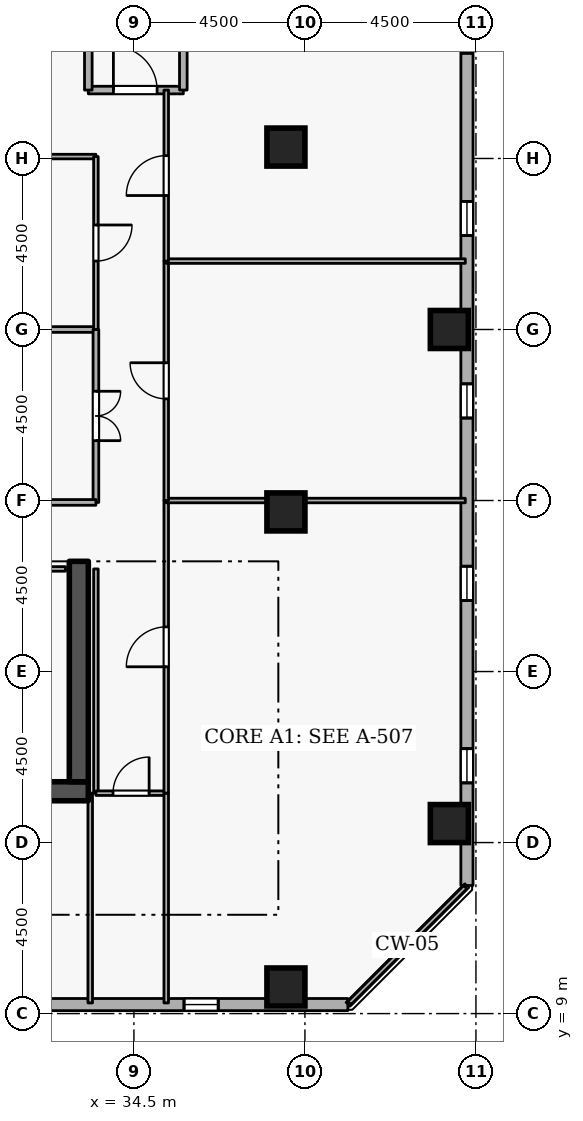
"""IFC4 building model, lengths in metres.
Left out: names, types, materials, properties, quantities, classifications, styles, units other than length and angle.
Written with IfcOpenShell. Run it as: python <this file> out.ifc"""

import sys

from ifc_helpers import new_model, si_unit, direction, frame, frame_2d, origin, origin_2d, place, context, subcontext, project, spatial, rectangle, extrude, element, fill, save


model = new_model("IFC4")
c1 = context("Model", 3, precision=1e-05, world=origin(), true_north=direction((0.0, 1.0)))
c2 = subcontext(c1, "Body", "Model", "MODEL_VIEW")
j1 = project(units=[si_unit("LENGTHUNIT", "METRE"), si_unit("PLANEANGLEUNIT", "RADIAN")], contexts=[c1])
p1 = place(None, origin())
s1 = spatial("IfcSite", under=j1, at=p1, CompositionType="ELEMENT")
p2 = place(p1, origin())
s2 = spatial("IfcBuilding", under=s1, at=p2, CompositionType="ELEMENT")
p3 = place(p2, frame((0.0, 0.0, 214.5)))
s3 = spatial("IfcBuildingStorey", under=s2, at=p3, CompositionType="ELEMENT", Elevation=214.5)
p4 = place(p3, frame((17.7, 14.85, 0.0), z_axis=(0.0, 0.0, 1.0), x_axis=(1.0, 0.0, 0.0)))
e1 = element("IfcWall", 1, at=p4, inside=s3, PredefinedType="SHEAR", context=c2, shape_type="SweptSolid", body=[
    extrude(rectangle(XDim=15.6, YDim=0.5, at=frame_2d((7.8, 0.0))), origin(), (0.0, 0.0, 1.0), 3.6),
])
p5 = place(p3, frame((33.05, 15.1, 0.0), z_axis=(0.0, 0.0, 1.0), x_axis=(0.0, 1.0, 0.0)))
e2 = element("IfcWall", 2, at=p5, inside=s3, PredefinedType="SHEAR", context=c2, shape_type="SweptSolid", body=[
    extrude(rectangle(XDim=5.8, YDim=0.5, at=frame_2d((2.9, 0.0))), origin(), (0.0, 0.0, 1.0), 3.6),
])
for number, where, z_axis, x_axis in (
    (3, (38.5, 9.7, 0.0), (0.0, 0.0, 1.0), (1.0, 0.0, 0.0)),
    (4, (42.8, 14.0, 0.0), (0.0, 0.0, 1.0), (1.0, 0.0, 0.0)),
    (5, (42.8, 27.0, 0.0), (0.0, 0.0, 1.0), (1.0, 0.0, 0.0)),
    (6, (38.5, 22.2, 0.0), (0.0, 0.0, 1.0), (1.0, 0.0, 0.0)),
    (7, (38.5, 31.8, 0.0), (0.0, 0.0, 1.0), (1.0, 0.0, 0.0)),
):
    element("IfcColumn", number, at=place(p3, frame(where, z_axis=z_axis, x_axis=x_axis)), inside=s3, PredefinedType="COLUMN", context=c2, shape_type="SweptSolid", body=[
        extrude(rectangle(XDim=1.0, YDim=1.0, at=origin_2d()), origin(), (0.0, 0.0, 1.0), 3.6),
    ])
p6 = place(p3, frame((4.319, 9.235, 0.0), z_axis=(0.0, 0.0, 1.0), x_axis=(0.999999998513, 5.4540124e-05, 0.0)))
e8 = element("IfcWall", 8, at=p6, inside=s3, PredefinedType="STANDARD", context=c2, shape_type="SweptSolid", body=[
    extrude(rectangle(XDim=35.811, YDim=0.32, at=frame_2d((17.905, 0.0))), origin(), (0.0, 0.0, 1.0), 2.7),
])
p7 = place(p6, frame((2.7, 0.0, 0.72)))
e9 = element("IfcOpeningElement", 9, at=p7, cuts=e8, PredefinedType="OPENING", context=c2, shape_type="SweptSolid", body=[
    extrude(rectangle(XDim=0.9, YDim=1.75, at=frame_2d((0.45, 0.875))), frame((0.0, 0.17, 0.0), z_axis=(0.0, -1.0, 0.0), x_axis=(1.0, 0.0, 0.0)), (0.0, 0.0, 1.0), 0.34),
])
p8 = place(p6, frame((12.3, 0.0, 0.72)))
e10 = element("IfcOpeningElement", 10, at=p8, cuts=e8, PredefinedType="OPENING", context=c2, shape_type="SweptSolid", body=[
    extrude(rectangle(XDim=0.9, YDim=1.75, at=frame_2d((0.45, 0.875))), frame((0.0, 0.17, 0.0), z_axis=(0.0, -1.0, 0.0), x_axis=(1.0, 0.0, 0.0)), (0.0, 0.0, 1.0), 0.34),
])
p9 = place(p6, frame((17.1, 0.0, 0.72)))
e11 = element("IfcOpeningElement", 11, at=p9, cuts=e8, PredefinedType="OPENING", context=c2, shape_type="SweptSolid", body=[
    extrude(rectangle(XDim=0.9, YDim=1.75, at=frame_2d((0.45, 0.875))), frame((0.0, 0.17, 0.0), z_axis=(0.0, -1.0, 0.0), x_axis=(1.0, 0.0, 0.0)), (0.0, 0.0, 1.0), 0.34),
])
p10 = place(p6, frame((26.7, 0.0, 0.72)))
e12 = element("IfcOpeningElement", 12, at=p10, cuts=e8, PredefinedType="OPENING", context=c2, shape_type="SweptSolid", body=[
    extrude(rectangle(XDim=0.9, YDim=1.75, at=frame_2d((0.45, 0.875))), frame((0.0, 0.17, 0.0), z_axis=(0.0, -1.0, 0.0), x_axis=(1.0, 0.0, 0.0)), (0.0, 0.0, 1.0), 0.34),
])
p11 = place(p6, frame((31.5, 0.0, 0.72)))
e13 = element("IfcOpeningElement", 13, at=p11, cuts=e8, PredefinedType="OPENING", context=c2, shape_type="SweptSolid", body=[
    extrude(rectangle(XDim=0.9, YDim=1.75, at=frame_2d((0.45, 0.875))), frame((0.0, 0.17, 0.0), z_axis=(0.0, -1.0, 0.0), x_axis=(1.0, 0.0, 0.0)), (0.0, 0.0, 1.0), 0.34),
])
p12 = place(p3, frame((43.263, 12.371, 0.0), z_axis=(0.0, 0.0, 1.0), x_axis=(5.4540124e-05, 0.999999998513, 0.0)))
e14 = element("IfcWall", 14, at=p12, inside=s3, PredefinedType="STANDARD", context=c2, shape_type="SweptSolid", body=[
    extrude(rectangle(XDim=35.811, YDim=0.32, at=frame_2d((17.905, 0.0))), origin(), (0.0, 0.0, 1.0), 2.7),
])
p13 = place(p12, frame((2.7, 0.0, 0.72)))
e15 = element("IfcOpeningElement", 15, at=p13, cuts=e14, PredefinedType="OPENING", context=c2, shape_type="SweptSolid", body=[
    extrude(rectangle(XDim=0.9, YDim=1.75, at=frame_2d((0.45, 0.875))), frame((0.0, 0.17, 0.0), z_axis=(0.0, -1.0, 0.0), x_axis=(1.0, 0.0, 0.0)), (0.0, 0.0, 1.0), 0.34),
])
p14 = place(p12, frame((7.5, 0.0, 0.72)))
e16 = element("IfcOpeningElement", 16, at=p14, cuts=e14, PredefinedType="OPENING", context=c2, shape_type="SweptSolid", body=[
    extrude(rectangle(XDim=0.9, YDim=1.75, at=frame_2d((0.45, 0.875))), frame((0.0, 0.17, 0.0), z_axis=(0.0, -1.0, 0.0), x_axis=(1.0, 0.0, 0.0)), (0.0, 0.0, 1.0), 0.34),
])
p15 = place(p12, frame((12.3, 0.0, 0.72)))
e17 = element("IfcOpeningElement", 17, at=p15, cuts=e14, PredefinedType="OPENING", context=c2, shape_type="SweptSolid", body=[
    extrude(rectangle(XDim=0.9, YDim=1.75, at=frame_2d((0.45, 0.875))), frame((0.0, 0.17, 0.0), z_axis=(0.0, -1.0, 0.0), x_axis=(1.0, 0.0, 0.0)), (0.0, 0.0, 1.0), 0.34),
])
p16 = place(p12, frame((17.1, 0.0, 0.72)))
e18 = element("IfcOpeningElement", 18, at=p16, cuts=e14, PredefinedType="OPENING", context=c2, shape_type="SweptSolid", body=[
    extrude(rectangle(XDim=0.9, YDim=1.75, at=frame_2d((0.45, 0.875))), frame((0.0, 0.17, 0.0), z_axis=(0.0, -1.0, 0.0), x_axis=(1.0, 0.0, 0.0)), (0.0, 0.0, 1.0), 0.34),
])
p17 = place(p12, frame((21.9, 0.0, 0.72)))
e19 = element("IfcOpeningElement", 19, at=p17, cuts=e14, PredefinedType="OPENING", context=c2, shape_type="SweptSolid", body=[
    extrude(rectangle(XDim=0.9, YDim=1.75, at=frame_2d((0.45, 0.875))), frame((0.0, 0.17, 0.0), z_axis=(0.0, -1.0, 0.0), x_axis=(1.0, 0.0, 0.0)), (0.0, 0.0, 1.0), 0.34),
])
p18 = place(p12, frame((31.5, 0.0, 0.72)))
e20 = element("IfcOpeningElement", 20, at=p18, cuts=e14, PredefinedType="OPENING", context=c2, shape_type="SweptSolid", body=[
    extrude(rectangle(XDim=0.9, YDim=1.75, at=frame_2d((0.45, 0.875))), frame((0.0, 0.17, 0.0), z_axis=(0.0, -1.0, 0.0), x_axis=(1.0, 0.0, 0.0)), (0.0, 0.0, 1.0), 0.34),
])
p19 = place(p3, frame((33.3, 33.3, 0.0), z_axis=(0.0, 0.0, 1.0), x_axis=(1.0, 0.0, 0.0)))
e21 = element("IfcWall", 21, at=p19, inside=s3, PredefinedType="STANDARD", context=c2, shape_type="SweptSolid", body=[
    extrude(rectangle(XDim=2.5, YDim=0.2, at=frame_2d((1.25, 0.0))), origin(), (0.0, 0.0, 1.0), 3.34),
])
p20 = place(p19, frame((0.66, 0.0, 0.0)))
e22 = element("IfcOpeningElement", 22, at=p20, cuts=e21, PredefinedType="OPENING", context=c2, shape_type="SweptSolid", body=[
    extrude(rectangle(XDim=1.15, YDim=2.1, at=frame_2d((0.575, 1.05))), frame((0.0, 0.11, 0.0), z_axis=(0.0, -1.0, 0.0), x_axis=(1.0, 0.0, 0.0)), (0.0, 0.0, 1.0), 0.22),
])
p21 = place(p3, frame((35.8, 33.3, 0.0), z_axis=(0.0, 0.0, 1.0), x_axis=(0.0, 1.0, 0.0)))
e23 = element("IfcWall", 23, at=p21, inside=s3, PredefinedType="STANDARD", context=c2, shape_type="SweptSolid", body=[
    extrude(rectangle(XDim=5.7, YDim=0.2, at=frame_2d((2.85, 0.0))), origin(), (0.0, 0.0, 1.0), 3.34),
])
p22 = place(p3, frame((33.3, 35.6, 0.0), z_axis=(0.0, 0.0, 1.0), x_axis=(0.0, -1.0, 0.0)))
e24 = element("IfcWall", 24, at=p22, inside=s3, PredefinedType="STANDARD", context=c2, shape_type="SweptSolid", body=[
    extrude(rectangle(XDim=2.3, YDim=0.2, at=frame_2d((1.15, 0.0))), origin(), (0.0, 0.0, 1.0), 2.545),
])
p23 = place(p3, frame((30.6, 20.7, 0.0), z_axis=(0.0, 0.0, 1.0), x_axis=(1.0, 0.0, 0.0)))
e25 = element("IfcWall", 25, at=p23, inside=s3, PredefinedType="PARTITIONING", context=c2, shape_type="SweptSolid", body=[
    extrude(rectangle(XDim=2.1, YDim=0.12, at=frame_2d((1.05, 0.0))), origin(), (0.0, 0.0, 1.0), 3.34),
])
p24 = place(p23, frame((0.575, 0.0, 0.0)))
e26 = element("IfcOpeningElement", 26, at=p24, cuts=e25, PredefinedType="OPENING", context=c2, shape_type="SweptSolid", body=[
    extrude(rectangle(XDim=0.95, YDim=2.1, at=frame_2d((0.475, 1.05))), frame((0.0, 0.07, 0.0), z_axis=(0.0, -1.0, 0.0), x_axis=(1.0, 0.0, 0.0)), (0.0, 0.0, 1.0), 0.14),
])
p25 = place(p3, frame((33.5, 20.7, 0.0), z_axis=(0.0, 0.0, 1.0), x_axis=(0.0, -1.0, 0.0)))
e27 = element("IfcWall", 27, at=p25, inside=s3, PredefinedType="PARTITIONING", context=c2, shape_type="SweptSolid", body=[
    extrude(rectangle(XDim=5.9, YDim=0.12, at=frame_2d((2.95, 0.0))), origin(), (0.0, 0.0, 1.0), 3.34),
])
p26 = place(p3, frame((33.5, 14.8, 0.0), z_axis=(0.0, 0.0, 1.0), x_axis=(1.0, 0.0, 0.0)))
e28 = element("IfcWall", 28, at=p26, inside=s3, PredefinedType="PARTITIONING", context=c2, shape_type="SweptSolid", body=[
    extrude(rectangle(XDim=1.85, YDim=0.12, at=frame_2d((0.925, 0.0))), origin(), (0.0, 0.0, 1.0), 3.34),
])
p27 = place(p26, frame((0.45, 0.0, 0.0)))
e29 = element("IfcOpeningElement", 29, at=p27, cuts=e28, PredefinedType="OPENING", context=c2, shape_type="SweptSolid", body=[
    extrude(rectangle(XDim=0.95, YDim=2.1, at=frame_2d((0.475, 1.05))), frame((0.0, 0.07, 0.0), z_axis=(0.0, -1.0, 0.0), x_axis=(1.0, 0.0, 0.0)), (0.0, 0.0, 1.0), 0.14),
])
for number, where, z_axis, x_axis in (
    (30, (35.35, 14.8, 0.0), (0.0, 0.0, 1.0), (0.0, -1.0, 0.0)),
    (31, (33.35, 9.28, 0.0), (0.0, 0.0, 1.0), (0.0, 1.0, 0.0)),
):
    element("IfcWall", number, at=place(p3, frame(where, z_axis=z_axis, x_axis=x_axis)), inside=s3, PredefinedType="PARTITIONING", context=c2, shape_type="SweptSolid", body=[
        extrude(rectangle(XDim=5.52, YDim=0.12, at=frame_2d((2.76, 0.0))), origin(), (0.0, 0.0, 1.0), 3.34),
    ])
p28 = place(p3, frame((35.35, 14.8, 0.0), z_axis=(0.0, 0.0, 1.0), x_axis=(0.0, 1.0, 0.0)))
e32 = element("IfcWall", 32, at=p28, inside=s3, PredefinedType="PARTITIONING", context=c2, shape_type="SweptSolid", body=[
    extrude(rectangle(XDim=7.7, YDim=0.12, at=frame_2d((3.85, 0.0))), origin(), (0.0, 0.0, 1.0), 3.34),
])
p29 = place(p28, frame((3.325, 0.0, 0.0)))
e33 = element("IfcOpeningElement", 33, at=p29, cuts=e32, PredefinedType="OPENING", context=c2, shape_type="SweptSolid", body=[
    extrude(rectangle(XDim=1.05, YDim=2.1, at=frame_2d((0.525, 1.05))), frame((0.0, 0.07, 0.0), z_axis=(0.0, -1.0, 0.0), x_axis=(1.0, 0.0, 0.0)), (0.0, 0.0, 1.0), 0.14),
])
p30 = place(p3, frame((35.35, 22.5, 0.0), z_axis=(0.0, 0.0, 1.0), x_axis=(1.0, 0.0, 0.0)))
e34 = element("IfcWall", 34, at=p30, inside=s3, PredefinedType="PARTITIONING", context=c2, shape_type="SweptSolid", body=[
    extrude(rectangle(XDim=7.87, YDim=0.12, at=frame_2d((3.935, 0.0))), origin(), (0.0, 0.0, 1.0), 3.34),
])
p31 = place(p3, frame((43.22, 12.329, 0.0), z_axis=(0.0, 0.0, 1.0), x_axis=(-0.707106781187, -0.707106781187, 0.0)))
e35 = element("IfcWall", 35, at=p31, inside=s3, PredefinedType="PARTITIONING", context=c2, shape_type="SweptSolid", body=[
    extrude(rectangle(XDim=4.311, YDim=0.12, at=frame_2d((2.156, 0.0))), origin(), (0.0, 0.0, 1.0), 3.34),
])
p32 = place(p3, frame((35.35, 22.5, 0.0), z_axis=(0.0, 0.0, 1.0), x_axis=(0.0, 1.0, 0.0)))
e36 = element("IfcWall", 36, at=p32, inside=s3, PredefinedType="PARTITIONING", context=c2, shape_type="SweptSolid", body=[
    extrude(rectangle(XDim=6.3, YDim=0.12, at=frame_2d((3.15, 0.0))), origin(), (0.0, 0.0, 1.0), 3.34),
])
p33 = place(p32, frame((2.675, 0.0, 0.0)))
e37 = element("IfcOpeningElement", 37, at=p33, cuts=e36, PredefinedType="OPENING", context=c2, shape_type="SweptSolid", body=[
    extrude(rectangle(XDim=0.95, YDim=2.1, at=frame_2d((0.475, 1.05))), frame((0.0, 0.07, 0.0), z_axis=(0.0, -1.0, 0.0), x_axis=(1.0, 0.0, 0.0)), (0.0, 0.0, 1.0), 0.14),
])
p34 = place(p3, frame((35.35, 28.8, 0.0), z_axis=(0.0, 0.0, 1.0), x_axis=(1.0, 0.0, 0.0)))
e38 = element("IfcWall", 38, at=p34, inside=s3, PredefinedType="PARTITIONING", context=c2, shape_type="SweptSolid", body=[
    extrude(rectangle(XDim=7.87, YDim=0.12, at=frame_2d((3.935, 0.0))), origin(), (0.0, 0.0, 1.0), 3.34),
])
p35 = place(p3, frame((35.35, 28.8, 0.0), z_axis=(0.0, 0.0, 1.0), x_axis=(0.0, 1.0, 0.0)))
e39 = element("IfcWall", 39, at=p35, inside=s3, PredefinedType="PARTITIONING", context=c2, shape_type="SweptSolid", body=[
    extrude(rectangle(XDim=4.5, YDim=0.12, at=frame_2d((2.25, 0.0))), origin(), (0.0, 0.0, 1.0), 3.34),
])
p36 = place(p35, frame((1.725, 0.0, 0.0)))
e40 = element("IfcOpeningElement", 40, at=p36, cuts=e39, PredefinedType="OPENING", context=c2, shape_type="SweptSolid", body=[
    extrude(rectangle(XDim=1.05, YDim=2.1, at=frame_2d((0.525, 1.05))), frame((0.0, 0.07, 0.0), z_axis=(0.0, -1.0, 0.0), x_axis=(1.0, 0.0, 0.0)), (0.0, 0.0, 1.0), 0.14),
])
p37 = place(p3, frame((30.7, 27.0, 0.0), z_axis=(0.0, 0.0, 1.0), x_axis=(1.0, 0.0, 0.0)))
e41 = element("IfcWall", 41, at=p37, inside=s3, PredefinedType="PARTITIONING", context=c2, shape_type="SweptSolid", body=[
    extrude(rectangle(XDim=2.8, YDim=0.15, at=frame_2d((1.4, 0.0))), origin(), (0.0, 0.0, 1.0), 2.878),
])
p38 = place(p3, frame((33.5, 27.0, 0.0), z_axis=(0.0, 0.0, 1.0), x_axis=(0.0, -1.0, 0.0)))
e42 = element("IfcWall", 42, at=p38, inside=s3, PredefinedType="PARTITIONING", context=c2, shape_type="SweptSolid", body=[
    extrude(rectangle(XDim=4.55, YDim=0.15, at=frame_2d((2.275, 0.0))), origin(), (0.0, 0.0, 1.0), 3.34),
])
p39 = place(p38, frame((1.625, 0.0, 0.0)))
e43 = element("IfcOpeningElement", 43, at=p39, cuts=e42, PredefinedType="OPENING", context=c2, shape_type="SweptSolid", body=[
    extrude(rectangle(XDim=1.3, YDim=2.12, at=frame_2d((0.65, 1.06))), frame((0.0, 0.085, 0.0), z_axis=(0.0, -1.0, 0.0), x_axis=(1.0, 0.0, 0.0)), (0.0, 0.0, 1.0), 0.17),
])
p40 = place(p3, frame((33.5, 22.45, 0.0), z_axis=(0.0, 0.0, 1.0), x_axis=(-1.0, 0.0, 0.0)))
e44 = element("IfcWall", 44, at=p40, inside=s3, PredefinedType="PARTITIONING", context=c2, shape_type="SweptSolid", body=[
    extrude(rectangle(XDim=2.8, YDim=0.15, at=frame_2d((1.4, 0.0))), origin(), (0.0, 0.0, 1.0), 3.34),
])
p41 = place(p3, frame((30.7, 31.55, 0.0), z_axis=(0.0, 0.0, 1.0), x_axis=(1.0, 0.0, 0.0)))
e45 = element("IfcWall", 45, at=p41, inside=s3, PredefinedType="PARTITIONING", context=c2, shape_type="SweptSolid", body=[
    extrude(rectangle(XDim=2.8, YDim=0.12, at=frame_2d((1.4, 0.0))), origin(), (0.0, 0.0, 1.0), 3.34),
])
p42 = place(p3, frame((33.5, 31.55, 0.0), z_axis=(0.0, 0.0, 1.0), x_axis=(0.0, -1.0, 0.0)))
e46 = element("IfcWall", 46, at=p42, inside=s3, PredefinedType="PARTITIONING", context=c2, shape_type="SweptSolid", body=[
    extrude(rectangle(XDim=4.55, YDim=0.12, at=frame_2d((2.275, 0.0))), origin(), (0.0, 0.0, 1.0), 3.34),
])
p43 = place(p42, frame((1.8, 0.0, 0.0)))
e47 = element("IfcOpeningElement", 47, at=p43, cuts=e46, PredefinedType="OPENING", context=c2, shape_type="SweptSolid", body=[
    extrude(rectangle(XDim=0.95, YDim=2.1, at=frame_2d((0.475, 1.05))), frame((0.0, 0.07, 0.0), z_axis=(0.0, -1.0, 0.0), x_axis=(1.0, 0.0, 0.0)), (0.0, 0.0, 1.0), 0.14),
])
p44 = place(p11, origin())
e48 = element("IfcWindow", 48, at=p44, inside=s3, PartitioningType="SINGLE_PANEL", PredefinedType="WINDOW", context=c2, shape_type="SweptSolid", body=[
    extrude(rectangle(XDim=0.9, YDim=1.75, at=frame_2d((0.45, 0.875))), frame((0.0, 0.03, 0.0), z_axis=(0.0, -1.0, 0.0), x_axis=(1.0, 0.0, 0.0)), (0.0, 0.0, 1.0), 0.06),
])
fill(e13, e48)
p45 = place(p13, origin())
e49 = element("IfcWindow", 49, at=p45, inside=s3, PartitioningType="SINGLE_PANEL", PredefinedType="WINDOW", context=c2, shape_type="SweptSolid", body=[
    extrude(rectangle(XDim=0.9, YDim=1.75, at=frame_2d((0.45, 0.875))), frame((0.0, 0.03, 0.0), z_axis=(0.0, -1.0, 0.0), x_axis=(1.0, 0.0, 0.0)), (0.0, 0.0, 1.0), 0.06),
])
fill(e15, e49)
p46 = place(p14, origin())
e50 = element("IfcWindow", 50, at=p46, inside=s3, PartitioningType="SINGLE_PANEL", PredefinedType="WINDOW", context=c2, shape_type="SweptSolid", body=[
    extrude(rectangle(XDim=0.9, YDim=1.75, at=frame_2d((0.45, 0.875))), frame((0.0, 0.03, 0.0), z_axis=(0.0, -1.0, 0.0), x_axis=(1.0, 0.0, 0.0)), (0.0, 0.0, 1.0), 0.06),
])
fill(e16, e50)
p47 = place(p15, origin())
e51 = element("IfcWindow", 51, at=p47, inside=s3, PartitioningType="SINGLE_PANEL", PredefinedType="WINDOW", context=c2, shape_type="SweptSolid", body=[
    extrude(rectangle(XDim=0.9, YDim=1.75, at=frame_2d((0.45, 0.875))), frame((0.0, 0.03, 0.0), z_axis=(0.0, -1.0, 0.0), x_axis=(1.0, 0.0, 0.0)), (0.0, 0.0, 1.0), 0.06),
])
fill(e17, e51)
p48 = place(p16, origin())
e52 = element("IfcWindow", 52, at=p48, inside=s3, PartitioningType="SINGLE_PANEL", PredefinedType="WINDOW", context=c2, shape_type="SweptSolid", body=[
    extrude(rectangle(XDim=0.9, YDim=1.75, at=frame_2d((0.45, 0.875))), frame((0.0, 0.03, 0.0), z_axis=(0.0, -1.0, 0.0), x_axis=(1.0, 0.0, 0.0)), (0.0, 0.0, 1.0), 0.06),
])
fill(e18, e52)
p49 = place(p17, origin())
e53 = element("IfcWindow", 53, at=p49, inside=s3, PartitioningType="SINGLE_PANEL", PredefinedType="WINDOW", context=c2, shape_type="SweptSolid", body=[
    extrude(rectangle(XDim=0.9, YDim=1.75, at=frame_2d((0.45, 0.875))), frame((0.0, 0.03, 0.0), z_axis=(0.0, -1.0, 0.0), x_axis=(1.0, 0.0, 0.0)), (0.0, 0.0, 1.0), 0.06),
])
fill(e19, e53)
p50 = place(p20, origin())
e54 = element("IfcDoor", 54, at=p50, inside=s3, OperationType="SINGLE_SWING_LEFT", PredefinedType="DOOR", context=c2, shape_type="SweptSolid", body=[
    extrude(rectangle(XDim=1.15, YDim=2.1, at=frame_2d((0.575, 1.05))), frame((0.0, 0.025, 0.0), z_axis=(0.0, -1.0, 0.0), x_axis=(1.0, 0.0, 0.0)), (0.0, 0.0, 1.0), 0.05),
])
fill(e22, e54)
p51 = place(p27, origin())
e55 = element("IfcDoor", 55, at=p51, inside=s3, OperationType="SINGLE_SWING_RIGHT", PredefinedType="DOOR", context=c2, shape_type="SweptSolid", body=[
    extrude(rectangle(XDim=0.95, YDim=2.1, at=frame_2d((0.475, 1.05))), frame((0.0, 0.025, 0.0), z_axis=(0.0, -1.0, 0.0), x_axis=(1.0, 0.0, 0.0)), (0.0, 0.0, 1.0), 0.05),
])
fill(e29, e55)
p52 = place(p29, origin())
e56 = element("IfcDoor", 56, at=p52, inside=s3, OperationType="SINGLE_SWING_LEFT", PredefinedType="DOOR", context=c2, shape_type="SweptSolid", body=[
    extrude(rectangle(XDim=1.05, YDim=2.1, at=frame_2d((0.525, 1.05))), frame((0.0, 0.025, 0.0), z_axis=(0.0, -1.0, 0.0), x_axis=(1.0, 0.0, 0.0)), (0.0, 0.0, 1.0), 0.05),
])
fill(e33, e56)
p53 = place(p33, origin())
e57 = element("IfcDoor", 57, at=p53, inside=s3, OperationType="SINGLE_SWING_RIGHT", PredefinedType="DOOR", context=c2, shape_type="SweptSolid", body=[
    extrude(rectangle(XDim=0.95, YDim=2.1, at=frame_2d((0.475, 1.05))), frame((0.0, 0.025, 0.0), z_axis=(0.0, -1.0, 0.0), x_axis=(1.0, 0.0, 0.0)), (0.0, 0.0, 1.0), 0.05),
])
fill(e37, e57)
p54 = place(p36, origin())
e58 = element("IfcDoor", 58, at=p54, inside=s3, OperationType="SINGLE_SWING_LEFT", PredefinedType="DOOR", context=c2, shape_type="SweptSolid", body=[
    extrude(rectangle(XDim=1.05, YDim=2.1, at=frame_2d((0.525, 1.05))), frame((0.0, 0.025, 0.0), z_axis=(0.0, -1.0, 0.0), x_axis=(1.0, 0.0, 0.0)), (0.0, 0.0, 1.0), 0.05),
])
fill(e40, e58)
p55 = place(p39, origin())
e59 = element("IfcDoor", 59, at=p55, inside=s3, OperationType="DOUBLE_DOOR_SINGLE_SWING", PredefinedType="DOOR", context=c2, shape_type="SweptSolid", body=[
    extrude(rectangle(XDim=1.3, YDim=2.12, at=frame_2d((0.65, 1.06))), frame((0.0, 0.025, 0.0), z_axis=(0.0, -1.0, 0.0), x_axis=(1.0, 0.0, 0.0)), (0.0, 0.0, 1.0), 0.05),
])
fill(e43, e59)
p56 = place(p43, origin())
e60 = element("IfcDoor", 60, at=p56, inside=s3, OperationType="SINGLE_SWING_LEFT", PredefinedType="DOOR", context=c2, shape_type="SweptSolid", body=[
    extrude(rectangle(XDim=0.95, YDim=2.1, at=frame_2d((0.475, 1.05))), frame((0.0, 0.025, 0.0), z_axis=(0.0, -1.0, 0.0), x_axis=(1.0, 0.0, 0.0)), (0.0, 0.0, 1.0), 0.05),
])
fill(e47, e60)
save(model, sys.argv[1])
